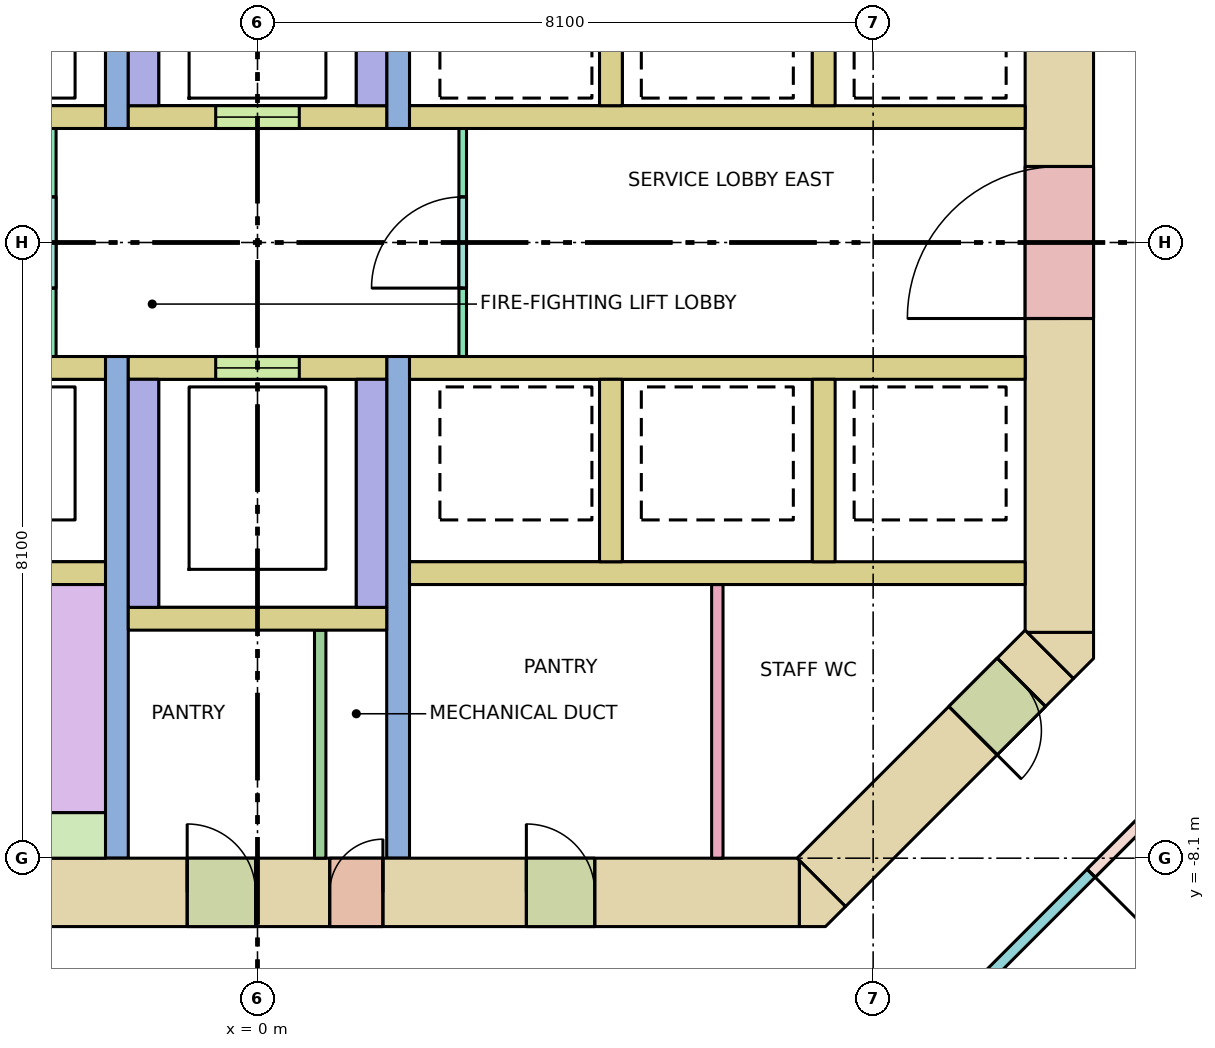
"""IFC4 building model, lengths in metres.
Left out: names, types, materials, properties, quantities, classifications, styles, units other than length and angle.
Written with IfcOpenShell. Run it as: python <this file> out.ifc"""

import sys

from ifc_helpers import new_model, si_unit, direction, frame, frame_2d, origin, place, context, subcontext, project, spatial, polyline, rectangle, outline, extrude, element, fill, save


model = new_model("IFC4")
c1 = context("Model", 3, precision=1e-05, world=origin(), true_north=direction((0.0, 1.0)))
c2 = subcontext(c1, "Body", "Model", "MODEL_VIEW")
j1 = project(units=[si_unit("LENGTHUNIT", "METRE"), si_unit("PLANEANGLEUNIT", "RADIAN")], contexts=[c1])
p1 = place(None, origin())
s1 = spatial("IfcSite", under=j1, at=p1, CompositionType="ELEMENT")
p2 = place(p1, origin())
s2 = spatial("IfcBuilding", under=s1, at=p2, CompositionType="ELEMENT")
p3 = place(p2, frame((0.0, 0.0, 86.6)))
s3 = spatial("IfcBuildingStorey", under=s2, at=p3, CompositionType="ELEMENT", Elevation=86.6)
p4 = place(p3, frame((-7.13, -8.55, -0.28), z_axis=(0.0, 0.0, 1.0), x_axis=(1.0, 0.0, 0.0)))
e1 = element("IfcWall", 1, at=p4, inside=s3, PredefinedType="SHEAR", context=c2, shape_type="SweptSolid", body=[
    extrude(rectangle(XDim=14.26, YDim=0.9, at=frame_2d((7.13, 0.0))), origin(), (0.0, 0.0, 1.0), 4.0),
])
p5 = place(p4, frame((8.08, 0.0, 0.28)))
e2 = element("IfcOpeningElement", 2, at=p5, cuts=e1, PredefinedType="OPENING", context=c2, shape_type="SweptSolid", body=[
    extrude(rectangle(XDim=0.7, YDim=2.1, at=frame_2d((0.35, 1.05))), frame((0.0, 0.46, 0.0), z_axis=(0.0, -1.0, 0.0), x_axis=(1.0, 0.0, 0.0)), (0.0, 0.0, 1.0), 0.92),
])
p6 = place(p4, frame((6.205, 0.0, 0.28)))
e3 = element("IfcOpeningElement", 3, at=p6, cuts=e1, PredefinedType="OPENING", context=c2, shape_type="SweptSolid", body=[
    extrude(rectangle(XDim=0.9, YDim=2.1, at=frame_2d((0.45, 1.05))), frame((0.0, 0.46, 0.0), z_axis=(0.0, -1.0, 0.0), x_axis=(1.0, 0.0, 0.0)), (0.0, 0.0, 1.0), 0.92),
])
p7 = place(p4, frame((10.667, 0.0, 0.28)))
e4 = element("IfcOpeningElement", 4, at=p7, cuts=e1, PredefinedType="OPENING", context=c2, shape_type="SweptSolid", body=[
    extrude(rectangle(XDim=0.9, YDim=2.1, at=frame_2d((0.45, 1.05))), frame((0.0, 0.46, 0.0), z_axis=(0.0, -1.0, 0.0), x_axis=(1.0, 0.0, 0.0)), (0.0, 0.0, 1.0), 0.92),
])
p8 = place(p3, frame((10.55, -5.13, -0.28), z_axis=(0.0, 0.0, 1.0), x_axis=(0.0, 1.0, 0.0)))
e5 = element("IfcWall", 5, at=p8, inside=s3, PredefinedType="SHEAR", context=c2, shape_type="SweptSolid", body=[
    extrude(rectangle(XDim=10.26, YDim=0.9, at=frame_2d((5.13, 0.0))), origin(), (0.0, 0.0, 1.0), 4.0),
])
p9 = place(p8, frame((4.13, 0.0, 0.28)))
e6 = element("IfcOpeningElement", 6, at=p9, cuts=e5, PredefinedType="OPENING", context=c2, shape_type="SweptSolid", body=[
    extrude(rectangle(XDim=2.0, YDim=2.1, at=frame_2d((1.0, 1.05))), frame((0.0, 0.46, 0.0), z_axis=(0.0, -1.0, 0.0), x_axis=(1.0, 0.0, 0.0)), (0.0, 0.0, 1.0), 0.92),
])
p10 = place(p3, frame((10.418, -5.418, -0.28), z_axis=(0.0, 0.0, 1.0), x_axis=(-0.707106781187, -0.707106781187, 0.0)))
e7 = element("IfcWall", 7, at=p10, inside=s3, PredefinedType="SHEAR", context=c2, shape_type="SweptSolid", body=[
    extrude(rectangle(XDim=4.243, YDim=0.9, at=frame_2d((2.121, 0.0))), origin(), (0.0, 0.0, 1.0), 4.0),
])
p11 = place(p10, frame((0.52, 0.0, 0.28)))
e8 = element("IfcOpeningElement", 8, at=p11, cuts=e7, PredefinedType="OPENING", context=c2, shape_type="SweptSolid", body=[
    extrude(rectangle(XDim=0.9, YDim=2.1, at=frame_2d((0.45, 1.05))), frame((0.0, 0.46, 0.0), z_axis=(0.0, -1.0, 0.0), x_axis=(1.0, 0.0, 0.0)), (0.0, 0.0, 1.0), 0.92),
])
p12 = place(p3, frame((0.0, 0.0, -0.28)))
e9 = element("IfcWall", 9, at=p12, inside=s3, PredefinedType="SHEAR", context=c2, shape_type="SweptSolid", body=[
    extrude(outline(polyline([(7.473, -9.0), (7.13, -9.0), (7.13, -8.13), (7.736, -8.736), (7.473, -9.0)])), origin(), (0.0, 0.0, 1.0), 4.0),
])
p13 = place(p3, frame((0.0, 0.0, -0.28)))
e10 = element("IfcWall", 10, at=p13, inside=s3, PredefinedType="SHEAR", context=c2, shape_type="SweptSolid", body=[
    extrude(outline(polyline([(11.0, -5.473), (10.736, -5.736), (10.13, -5.13), (11.0, -5.13), (11.0, -5.473)])), origin(), (0.0, 0.0, 1.0), 4.0),
])
for number, where, z_axis, x_axis in (
    (11, (-10.1, -4.35, 0.0), (0.0, 0.0, 1.0), (1.0, 0.0, 0.0)),
    (12, (2.0, -4.35, 0.0), (0.0, 0.0, 1.0), (1.0, 0.0, 0.0)),
):
    element("IfcWall", number, at=place(p3, frame(where, z_axis=z_axis, x_axis=x_axis)), inside=s3, PredefinedType="SOLIDWALL", context=c2, shape_type="SweptSolid", body=[
        extrude(rectangle(XDim=8.1, YDim=0.3, at=frame_2d((4.05, 0.0))), origin(), (0.0, 0.0, 1.0), 3.72),
    ])
p14 = place(p3, frame((-10.1, 1.65, 0.0), z_axis=(0.0, 0.0, 1.0), x_axis=(1.0, 0.0, 0.0)))
e13 = element("IfcWall", 13, at=p14, inside=s3, PredefinedType="SOLIDWALL", context=c2, shape_type="SweptSolid", body=[
    extrude(rectangle(XDim=8.1, YDim=0.3, at=frame_2d((4.05, 0.0))), origin(), (0.0, 0.0, 1.0), 3.72),
])
p15 = place(p14, frame((0.7, 0.0, 0.0)))
e14 = element("IfcOpeningElement", 14, at=p15, cuts=e13, PredefinedType="OPENING", context=c2, shape_type="SweptSolid", body=[
    extrude(rectangle(XDim=1.1, YDim=2.1, at=frame_2d((0.55, 1.05))), frame((0.0, 0.16, 0.0), z_axis=(0.0, -1.0, 0.0), x_axis=(1.0, 0.0, 0.0)), (0.0, 0.0, 1.0), 0.32),
])
p16 = place(p14, frame((3.5, 0.0, 0.0)))
e15 = element("IfcOpeningElement", 15, at=p16, cuts=e13, PredefinedType="OPENING", context=c2, shape_type="SweptSolid", body=[
    extrude(rectangle(XDim=1.1, YDim=2.1, at=frame_2d((0.55, 1.05))), frame((0.0, 0.16, 0.0), z_axis=(0.0, -1.0, 0.0), x_axis=(1.0, 0.0, 0.0)), (0.0, 0.0, 1.0), 0.32),
])
p17 = place(p14, frame((6.15, 0.0, 0.0)))
e16 = element("IfcOpeningElement", 16, at=p17, cuts=e13, PredefinedType="OPENING", context=c2, shape_type="SweptSolid", body=[
    extrude(rectangle(XDim=1.1, YDim=2.1, at=frame_2d((0.55, 1.05))), frame((0.0, 0.16, 0.0), z_axis=(0.0, -1.0, 0.0), x_axis=(1.0, 0.0, 0.0)), (0.0, 0.0, 1.0), 0.32),
])
p18 = place(p3, frame((-10.1, -1.65, 0.0), z_axis=(0.0, 0.0, 1.0), x_axis=(1.0, 0.0, 0.0)))
e17 = element("IfcWall", 17, at=p18, inside=s3, PredefinedType="SOLIDWALL", context=c2, shape_type="SweptSolid", body=[
    extrude(rectangle(XDim=8.1, YDim=0.3, at=frame_2d((4.05, 0.0))), origin(), (0.0, 0.0, 1.0), 3.72),
])
p19 = place(p18, frame((0.7, 0.0, 0.0)))
e18 = element("IfcOpeningElement", 18, at=p19, cuts=e17, PredefinedType="OPENING", context=c2, shape_type="SweptSolid", body=[
    extrude(rectangle(XDim=1.1, YDim=2.1, at=frame_2d((0.55, 1.05))), frame((0.0, 0.16, 0.0), z_axis=(0.0, -1.0, 0.0), x_axis=(1.0, 0.0, 0.0)), (0.0, 0.0, 1.0), 0.32),
])
p20 = place(p18, frame((3.5, 0.0, 0.0)))
e19 = element("IfcOpeningElement", 19, at=p20, cuts=e17, PredefinedType="OPENING", context=c2, shape_type="SweptSolid", body=[
    extrude(rectangle(XDim=1.1, YDim=2.1, at=frame_2d((0.55, 1.05))), frame((0.0, 0.16, 0.0), z_axis=(0.0, -1.0, 0.0), x_axis=(1.0, 0.0, 0.0)), (0.0, 0.0, 1.0), 0.32),
])
p21 = place(p18, frame((6.15, 0.0, 0.0)))
e20 = element("IfcOpeningElement", 20, at=p21, cuts=e17, PredefinedType="OPENING", context=c2, shape_type="SweptSolid", body=[
    extrude(rectangle(XDim=1.1, YDim=2.1, at=frame_2d((0.55, 1.05))), frame((0.0, 0.16, 0.0), z_axis=(0.0, -1.0, 0.0), x_axis=(1.0, 0.0, 0.0)), (0.0, 0.0, 1.0), 0.32),
])
for number, where, z_axis, x_axis in (
    (21, (2.0, 1.65, 0.0), (0.0, 0.0, 1.0), (1.0, 0.0, 0.0)),
    (22, (2.0, -1.65, 0.0), (0.0, 0.0, 1.0), (1.0, 0.0, 0.0)),
):
    element("IfcWall", number, at=place(p3, frame(where, z_axis=z_axis, x_axis=x_axis)), inside=s3, PredefinedType="SOLIDWALL", context=c2, shape_type="SweptSolid", body=[
        extrude(rectangle(XDim=8.1, YDim=0.3, at=frame_2d((4.05, 0.0))), origin(), (0.0, 0.0, 1.0), 3.72),
    ])
for number, where, z_axis, x_axis in (
    (23, (4.65, 1.8, 0.0), (0.0, 0.0, 1.0), (0.0, 1.0, 0.0)),
    (24, (4.65, -4.2, 0.0), (0.0, 0.0, 1.0), (0.0, 1.0, 0.0)),
    (25, (7.45, 1.8, 0.0), (0.0, 0.0, 1.0), (0.0, 1.0, 0.0)),
    (26, (7.45, -4.2, 0.0), (0.0, 0.0, 1.0), (0.0, 1.0, 0.0)),
):
    element("IfcWall", number, at=place(p3, frame(where, z_axis=z_axis, x_axis=x_axis)), inside=s3, PredefinedType="SOLIDWALL", context=c2, shape_type="SweptSolid", body=[
        extrude(rectangle(XDim=2.4, YDim=0.3, at=frame_2d((1.2, 0.0))), origin(), (0.0, 0.0, 1.0), 3.72),
    ])
for number, where, z_axis, x_axis in (
    (27, (-1.85, 1.5, 0.0), (0.0, 0.0, 1.0), (0.0, 1.0, 0.0)),
    (28, (-1.85, -8.1, 0.0), (0.0, 0.0, 1.0), (0.0, 1.0, 0.0)),
    (29, (1.85, 1.5, 0.0), (0.0, 0.0, 1.0), (0.0, 1.0, 0.0)),
    (30, (1.85, -8.1, 0.0), (0.0, 0.0, 1.0), (0.0, 1.0, 0.0)),
):
    element("IfcWall", number, at=place(p3, frame(where, z_axis=z_axis, x_axis=x_axis)), inside=s3, PredefinedType="SHEAR", context=c2, shape_type="SweptSolid", body=[
        extrude(rectangle(XDim=6.6, YDim=0.3, at=frame_2d((3.3, 0.0))), origin(), (0.0, 0.0, 1.0), 3.72),
    ])
p22 = place(p3, frame((-1.7, 1.65, 0.0), z_axis=(0.0, 0.0, 1.0), x_axis=(1.0, 0.0, 0.0)))
e31 = element("IfcWall", 31, at=p22, inside=s3, PredefinedType="SOLIDWALL", context=c2, shape_type="SweptSolid", body=[
    extrude(rectangle(XDim=3.4, YDim=0.3, at=frame_2d((1.7, 0.0))), origin(), (0.0, 0.0, 1.0), 3.72),
])
p23 = place(p22, frame((1.15, 0.0, 0.0)))
e32 = element("IfcOpeningElement", 32, at=p23, cuts=e31, PredefinedType="OPENING", context=c2, shape_type="SweptSolid", body=[
    extrude(rectangle(XDim=1.1, YDim=2.1, at=frame_2d((0.55, 1.05))), frame((0.0, 0.16, 0.0), z_axis=(0.0, -1.0, 0.0), x_axis=(1.0, 0.0, 0.0)), (0.0, 0.0, 1.0), 0.32),
])
p24 = place(p3, frame((-1.7, -1.65, 0.0), z_axis=(0.0, 0.0, 1.0), x_axis=(1.0, 0.0, 0.0)))
e33 = element("IfcWall", 33, at=p24, inside=s3, PredefinedType="SOLIDWALL", context=c2, shape_type="SweptSolid", body=[
    extrude(rectangle(XDim=3.4, YDim=0.3, at=frame_2d((1.7, 0.0))), origin(), (0.0, 0.0, 1.0), 3.72),
])
p25 = place(p24, frame((1.15, 0.0, 0.0)))
e34 = element("IfcOpeningElement", 34, at=p25, cuts=e33, PredefinedType="OPENING", context=c2, shape_type="SweptSolid", body=[
    extrude(rectangle(XDim=1.1, YDim=2.1, at=frame_2d((0.55, 1.05))), frame((0.0, 0.16, 0.0), z_axis=(0.0, -1.0, 0.0), x_axis=(1.0, 0.0, 0.0)), (0.0, 0.0, 1.0), 0.32),
])
for number, where, z_axis, x_axis in (
    (35, (-1.5, 1.8, 0.0), (0.0, 0.0, 1.0), (0.0, 1.0, 0.0)),
    (36, (-1.5, -4.8, 0.0), (0.0, 0.0, 1.0), (0.0, 1.0, 0.0)),
    (37, (1.5, 1.8, 0.0), (0.0, 0.0, 1.0), (0.0, 1.0, 0.0)),
    (38, (1.5, -4.8, 0.0), (0.0, 0.0, 1.0), (0.0, 1.0, 0.0)),
):
    element("IfcWall", number, at=place(p3, frame(where, z_axis=z_axis, x_axis=x_axis)), inside=s3, PredefinedType="SOLIDWALL", context=c2, shape_type="SweptSolid", body=[
        extrude(rectangle(XDim=3.0, YDim=0.4, at=frame_2d((1.5, 0.0))), origin(), (0.0, 0.0, 1.0), 3.72),
    ])
p26 = place(p3, frame((-1.7, -4.95, 0.0), z_axis=(0.0, 0.0, 1.0), x_axis=(1.0, 0.0, 0.0)))
e39 = element("IfcWall", 39, at=p26, inside=s3, PredefinedType="SOLIDWALL", context=c2, shape_type="SweptSolid", body=[
    extrude(rectangle(XDim=3.4, YDim=0.3, at=frame_2d((1.7, 0.0))), origin(), (0.0, 0.0, 1.0), 3.72),
])
p27 = place(p3, frame((-7.37, -7.8, 0.0), z_axis=(0.0, 0.0, 1.0), x_axis=(1.0, 0.0, 0.0)))
e40 = element("IfcWall", 40, at=p27, inside=s3, PredefinedType="SHEAR", context=c2, shape_type="SweptSolid", body=[
    extrude(rectangle(XDim=5.37, YDim=0.6, at=frame_2d((2.685, 0.0))), origin(), (0.0, 0.0, 1.0), 3.72),
])
p28 = place(p3, frame((-2.7, -1.5, 0.0), z_axis=(0.0, 0.0, 1.0), x_axis=(0.0, 1.0, 0.0)))
e41 = element("IfcWall", 41, at=p28, inside=s3, PredefinedType="PARTITIONING", context=c2, shape_type="SweptSolid", body=[
    extrude(rectangle(XDim=3.0, YDim=0.1, at=frame_2d((1.5, 0.0))), origin(), (0.0, 0.0, 1.0), 3.72),
])
p29 = place(p28, frame((0.9, 0.0, 0.0)))
e42 = element("IfcOpeningElement", 42, at=p29, cuts=e41, PredefinedType="OPENING", context=c2, shape_type="SweptSolid", body=[
    extrude(rectangle(XDim=1.2, YDim=2.1, at=frame_2d((0.6, 1.05))), frame((0.0, 0.06, 0.0), z_axis=(0.0, -1.0, 0.0), x_axis=(1.0, 0.0, 0.0)), (0.0, 0.0, 1.0), 0.12),
])
p30 = place(p3, frame((2.7, -1.5, 0.0), z_axis=(0.0, 0.0, 1.0), x_axis=(0.0, 1.0, 0.0)))
e43 = element("IfcWall", 43, at=p30, inside=s3, PredefinedType="PARTITIONING", context=c2, shape_type="SweptSolid", body=[
    extrude(rectangle(XDim=3.0, YDim=0.1, at=frame_2d((1.5, 0.0))), origin(), (0.0, 0.0, 1.0), 3.72),
])
p31 = place(p30, frame((0.9, 0.0, 0.0)))
e44 = element("IfcOpeningElement", 44, at=p31, cuts=e43, PredefinedType="OPENING", context=c2, shape_type="SweptSolid", body=[
    extrude(rectangle(XDim=1.2, YDim=2.1, at=frame_2d((0.6, 1.05))), frame((0.0, 0.06, 0.0), z_axis=(0.0, -1.0, 0.0), x_axis=(1.0, 0.0, 0.0)), (0.0, 0.0, 1.0), 0.12),
])
p32 = place(p3, frame((0.825, -8.1, 0.0), z_axis=(0.0, 0.0, 1.0), x_axis=(0.0, 1.0, 0.0)))
e45 = element("IfcWall", 45, at=p32, inside=s3, PredefinedType="PARTITIONING", context=c2, shape_type="SweptSolid", body=[
    extrude(rectangle(XDim=3.0, YDim=0.15, at=frame_2d((1.5, 0.0))), origin(), (0.0, 0.0, 1.0), 3.72),
])
p33 = place(p3, frame((6.05, -8.1, 0.0), z_axis=(0.0, 0.0, 1.0), x_axis=(0.0, 1.0, 0.0)))
e46 = element("IfcWall", 46, at=p33, inside=s3, PredefinedType="PARTITIONING", context=c2, shape_type="SweptSolid", body=[
    extrude(rectangle(XDim=3.6, YDim=0.15, at=frame_2d((1.8, 0.0))), origin(), (0.0, 0.0, 1.0), 3.72),
])
p34 = place(p3, frame((12.975, -6.291, 0.0), z_axis=(0.0, 0.0, 1.0), x_axis=(-0.707106781187, -0.707106781187, 0.0)))
e47 = element("IfcWall", 47, at=p34, inside=s3, PredefinedType="PARTITIONING", context=c2, shape_type="SweptSolid", body=[
    extrude(rectangle(XDim=6.624, YDim=0.15, at=frame_2d((3.312, 0.0))), origin(), (0.0, 0.0, 1.0), 2.82),
])
p35 = place(p34, frame((1.938, 0.0, 0.0)))
e48 = element("IfcOpeningElement", 48, at=p35, cuts=e47, PredefinedType="OPENING", context=c2, shape_type="SweptSolid", body=[
    extrude(rectangle(XDim=0.9, YDim=2.1, at=frame_2d((0.45, 1.05))), frame((0.0, 0.085, 0.0), z_axis=(0.0, -1.0, 0.0), x_axis=(1.0, 0.0, 0.0)), (0.0, 0.0, 1.0), 0.17),
])
p36 = place(p23, origin())
e49 = element("IfcDoor", 49, at=p36, inside=s3, OperationType="DOUBLE_DOOR_SLIDING", PredefinedType="DOOR", context=c2, shape_type="SweptSolid", body=[
    extrude(rectangle(XDim=1.1, YDim=2.1, at=frame_2d((0.55, 1.05))), frame((0.0, 0.025, 0.0), z_axis=(0.0, -1.0, 0.0), x_axis=(1.0, 0.0, 0.0)), (0.0, 0.0, 1.0), 0.05),
])
fill(e32, e49)
p37 = place(p25, origin())
e50 = element("IfcDoor", 50, at=p37, inside=s3, OperationType="DOUBLE_DOOR_SLIDING", PredefinedType="DOOR", context=c2, shape_type="SweptSolid", body=[
    extrude(rectangle(XDim=1.1, YDim=2.1, at=frame_2d((0.55, 1.05))), frame((0.0, 0.025, 0.0), z_axis=(0.0, -1.0, 0.0), x_axis=(1.0, 0.0, 0.0)), (0.0, 0.0, 1.0), 0.05),
])
fill(e34, e50)
p38 = place(p9, origin())
e51 = element("IfcDoor", 51, at=p38, inside=s3, OperationType="DOUBLE_DOOR_SINGLE_SWING", PredefinedType="DOOR", context=c2, shape_type="SweptSolid", body=[
    extrude(rectangle(XDim=2.0, YDim=2.1, at=frame_2d((1.0, 1.05))), frame((0.0, 0.025, 0.0), z_axis=(0.0, -1.0, 0.0), x_axis=(1.0, 0.0, 0.0)), (0.0, 0.0, 1.0), 0.05),
])
fill(e6, e51)
p39 = place(p29, origin())
e52 = element("IfcDoor", 52, at=p39, inside=s3, OperationType="SINGLE_SWING_LEFT", PredefinedType="DOOR", context=c2, shape_type="SweptSolid", body=[
    extrude(rectangle(XDim=1.2, YDim=2.1, at=frame_2d((0.6, 1.05))), frame((0.0, 0.025, 0.0), z_axis=(0.0, -1.0, 0.0), x_axis=(1.0, 0.0, 0.0)), (0.0, 0.0, 1.0), 0.05),
])
fill(e42, e52)
p40 = place(p31, origin())
e53 = element("IfcDoor", 53, at=p40, inside=s3, OperationType="SINGLE_SWING_LEFT", PredefinedType="DOOR", context=c2, shape_type="SweptSolid", body=[
    extrude(rectangle(XDim=1.2, YDim=2.1, at=frame_2d((0.6, 1.05))), frame((0.0, 0.025, 0.0), z_axis=(0.0, -1.0, 0.0), x_axis=(1.0, 0.0, 0.0)), (0.0, 0.0, 1.0), 0.05),
])
fill(e44, e53)
p41 = place(p5, origin())
e54 = element("IfcDoor", 54, at=p41, inside=s3, OperationType="SINGLE_SWING_RIGHT", PredefinedType="DOOR", context=c2, shape_type="SweptSolid", body=[
    extrude(rectangle(XDim=0.7, YDim=2.1, at=frame_2d((0.35, 1.05))), frame((0.0, 0.025, 0.0), z_axis=(0.0, -1.0, 0.0), x_axis=(1.0, 0.0, 0.0)), (0.0, 0.0, 1.0), 0.05),
])
fill(e2, e54)
p42 = place(p6, origin())
e55 = element("IfcDoor", 55, at=p42, inside=s3, OperationType="SINGLE_SWING_LEFT", PredefinedType="DOOR", context=c2, shape_type="SweptSolid", body=[
    extrude(rectangle(XDim=0.9, YDim=2.1, at=frame_2d((0.45, 1.05))), frame((0.0, 0.025, 0.0), z_axis=(0.0, -1.0, 0.0), x_axis=(1.0, 0.0, 0.0)), (0.0, 0.0, 1.0), 0.05),
])
fill(e3, e55)
p43 = place(p7, origin())
e56 = element("IfcDoor", 56, at=p43, inside=s3, OperationType="SINGLE_SWING_LEFT", PredefinedType="DOOR", context=c2, shape_type="SweptSolid", body=[
    extrude(rectangle(XDim=0.9, YDim=2.1, at=frame_2d((0.45, 1.05))), frame((0.0, 0.025, 0.0), z_axis=(0.0, -1.0, 0.0), x_axis=(1.0, 0.0, 0.0)), (0.0, 0.0, 1.0), 0.05),
])
fill(e4, e56)
p44 = place(p11, origin())
e57 = element("IfcDoor", 57, at=p44, inside=s3, OperationType="SINGLE_SWING_RIGHT", PredefinedType="DOOR", context=c2, shape_type="SweptSolid", body=[
    extrude(rectangle(XDim=0.9, YDim=2.1, at=frame_2d((0.45, 1.05))), frame((0.0, 0.025, 0.0), z_axis=(0.0, -1.0, 0.0), x_axis=(1.0, 0.0, 0.0)), (0.0, 0.0, 1.0), 0.05),
])
fill(e8, e57)
p45 = place(p35, origin())
e58 = element("IfcDoor", 58, at=p45, inside=s3, OperationType="SINGLE_SWING_RIGHT", PredefinedType="DOOR", context=c2, shape_type="SweptSolid", body=[
    extrude(rectangle(XDim=0.9, YDim=2.1, at=frame_2d((0.45, 1.05))), frame((0.0, 0.025, 0.0), z_axis=(0.0, -1.0, 0.0), x_axis=(1.0, 0.0, 0.0)), (0.0, 0.0, 1.0), 0.05),
])
fill(e48, e58)
save(model, sys.argv[1])
